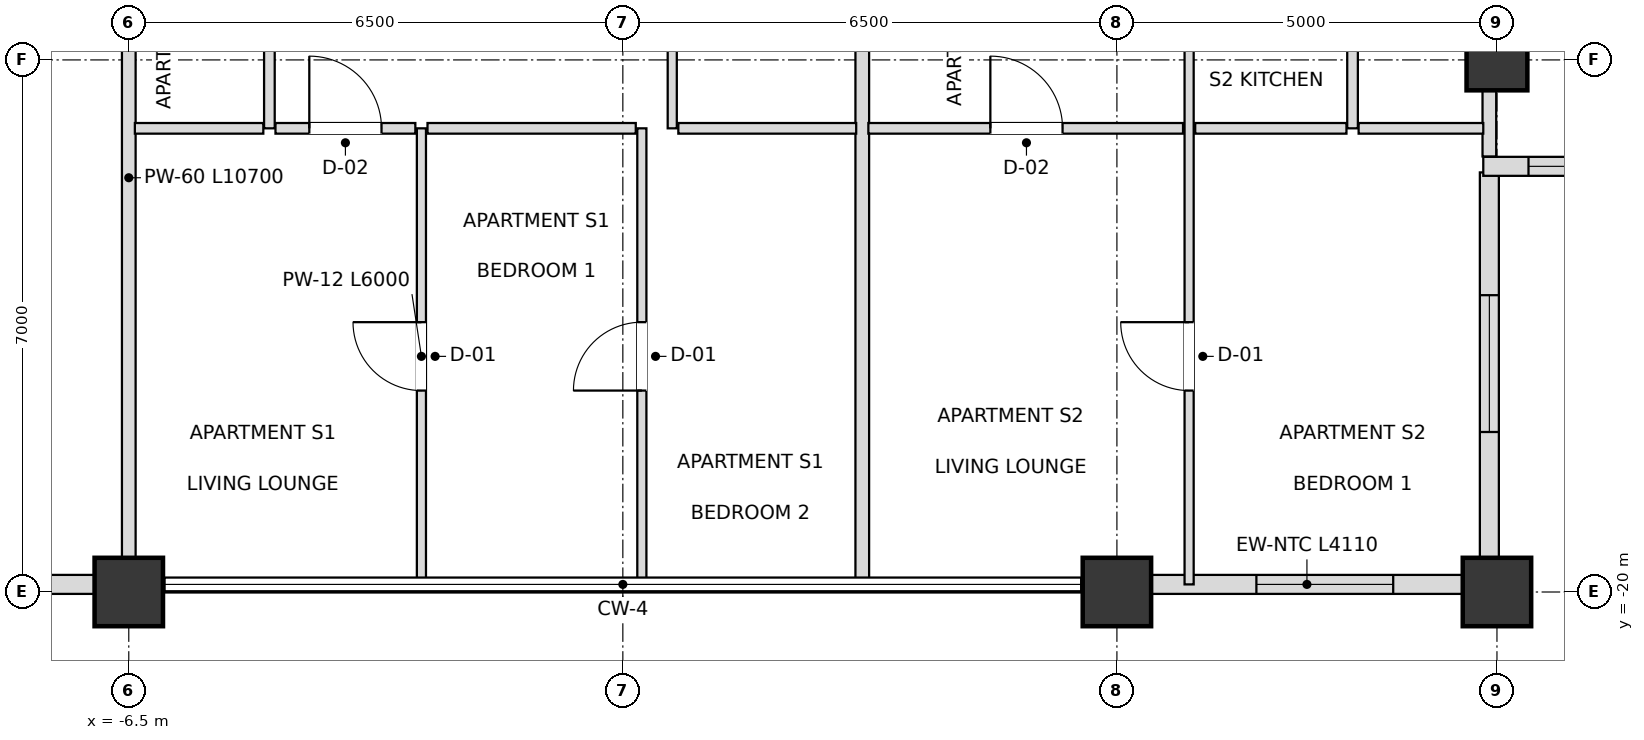
"""IFC4 building model, lengths in metres.
Left out: names, types, materials, properties, quantities, classifications, styles, units other than length and angle.
Written with IfcOpenShell. Run it as: python <this file> out.ifc"""

import sys

from ifc_helpers import new_model, si_unit, direction, frame, frame_2d, origin, origin_2d, place, context, subcontext, project, spatial, rectangle, extrude, element, fill, save


model = new_model("IFC4")
c1 = context("Model", 3, precision=1e-05, world=origin(), true_north=direction((0.0, 1.0)))
c2 = subcontext(c1, "Body", "Model", "MODEL_VIEW")
j1 = project(units=[si_unit("LENGTHUNIT", "METRE"), si_unit("PLANEANGLEUNIT", "RADIAN")], contexts=[c1])
p1 = place(None, origin())
s1 = spatial("IfcSite", under=j1, at=p1, CompositionType="ELEMENT")
p2 = place(p1, origin())
s2 = spatial("IfcBuilding", under=s1, at=p2, CompositionType="ELEMENT")
p3 = place(p2, frame((0.0, 0.0, 236.7)))
s3 = spatial("IfcBuildingStorey", under=s2, at=p3, CompositionType="ELEMENT", Elevation=236.7)
for number, where, z_axis, x_axis in (
    (1, (-6.5, -20.0, 0.0), (0.0, 0.0, 1.0), (1.0, 0.0, 0.0)),
    (2, (6.5, -20.0, 0.0), (0.0, 0.0, 1.0), (1.0, 0.0, 0.0)),
    (3, (11.5, -20.0, 0.0), (0.0, 0.0, 1.0), (1.0, 0.0, 0.0)),
):
    element("IfcColumn", number, at=place(p3, frame(where, z_axis=z_axis, x_axis=x_axis)), inside=s3, PredefinedType="USERDEFINED", context=c2, shape_type="SweptSolid", body=[
        extrude(rectangle(XDim=0.9, YDim=0.9, at=origin_2d()), origin(), (0.0, 0.0, 1.0), 3.6),
    ])
p4 = place(p3, frame((11.5, -13.0, 0.0), z_axis=(0.0, 0.0, 1.0), x_axis=(1.0, 0.0, 0.0)))
e4 = element("IfcColumn", 4, at=p4, inside=s3, PredefinedType="COLUMN", context=c2, shape_type="SweptSolid", body=[
    extrude(rectangle(XDim=0.8, YDim=0.8, at=origin_2d()), origin(), (0.0, 0.0, 1.0), 3.6),
])
p5 = place(p3, frame((-11.055, -19.9, 0.0), z_axis=(0.0, 0.0, 1.0), x_axis=(1.0, 0.0, 0.0)))
e5 = element("IfcWall", 5, at=p5, inside=s3, PredefinedType="SOLIDWALL", context=c2, shape_type="SweptSolid", body=[
    extrude(rectangle(XDim=4.11, YDim=0.25, at=frame_2d((2.055, 0.0))), origin(), (0.0, 0.0, 1.0), 2.748),
])
p6 = place(p5, frame((1.155, 0.0, 0.72)))
e6 = element("IfcOpeningElement", 6, at=p6, cuts=e5, PredefinedType="OPENING", context=c2, shape_type="SweptSolid", body=[
    extrude(rectangle(XDim=1.8, YDim=1.68, at=frame_2d((0.9, 0.84))), frame((0.0, 0.135, 0.0), z_axis=(0.0, -1.0, 0.0), x_axis=(1.0, 0.0, 0.0)), (0.0, 0.0, 1.0), 0.27),
])
p7 = place(p3, frame((6.945, -19.9, 0.0), z_axis=(0.0, 0.0, 1.0), x_axis=(1.0, 0.0, 0.0)))
e7 = element("IfcWall", 7, at=p7, inside=s3, PredefinedType="SOLIDWALL", context=c2, shape_type="SweptSolid", body=[
    extrude(rectangle(XDim=4.11, YDim=0.25, at=frame_2d((2.055, 0.0))), origin(), (0.0, 0.0, 1.0), 2.748),
])
p8 = place(p7, frame((1.39, 0.0, 0.72)))
e8 = element("IfcOpeningElement", 8, at=p8, cuts=e7, PredefinedType="OPENING", context=c2, shape_type="SweptSolid", body=[
    extrude(rectangle(XDim=1.8, YDim=1.68, at=frame_2d((0.9, 0.84))), frame((0.0, 0.135, 0.0), z_axis=(0.0, -1.0, 0.0), x_axis=(1.0, 0.0, 0.0)), (0.0, 0.0, 1.0), 0.27),
])
p9 = place(p3, frame((11.4, -19.82, 0.0), z_axis=(0.0, 0.0, 1.0), x_axis=(0.0, 1.0, 0.0)))
e9 = element("IfcWall", 9, at=p9, inside=s3, PredefinedType="SOLIDWALL", context=c2, shape_type="SweptSolid", body=[
    extrude(rectangle(XDim=5.34, YDim=0.25, at=frame_2d((2.67, 0.0))), origin(), (0.0, 0.0, 1.0), 2.748),
])
p10 = place(p9, frame((1.925, 0.0, 0.72)))
e10 = element("IfcOpeningElement", 10, at=p10, cuts=e9, PredefinedType="OPENING", context=c2, shape_type="SweptSolid", body=[
    extrude(rectangle(XDim=1.8, YDim=1.68, at=frame_2d((0.9, 0.84))), frame((0.0, 0.135, 0.0), z_axis=(0.0, -1.0, 0.0), x_axis=(1.0, 0.0, 0.0)), (0.0, 0.0, 1.0), 0.27),
])
p11 = place(p3, frame((11.32, -14.4, 0.0), z_axis=(0.0, 0.0, 1.0), x_axis=(1.0, 0.0, 0.0)))
e11 = element("IfcWall", 11, at=p11, inside=s3, PredefinedType="SOLIDWALL", context=c2, shape_type="SweptSolid", body=[
    extrude(rectangle(XDim=5.66, YDim=0.25, at=frame_2d((2.83, 0.0))), origin(), (0.0, 0.0, 1.0), 2.748),
])
p12 = place(p11, frame((0.595, 0.0, 0.72)))
e12 = element("IfcOpeningElement", 12, at=p12, cuts=e11, PredefinedType="OPENING", context=c2, shape_type="SweptSolid", body=[
    extrude(rectangle(XDim=1.8, YDim=1.68, at=frame_2d((0.9, 0.84))), frame((0.0, 0.135, 0.0), z_axis=(0.0, -1.0, 0.0), x_axis=(1.0, 0.0, 0.0)), (0.0, 0.0, 1.0), 0.27),
])
p13 = place(p11, frame((3.265, 0.0, 0.72)))
e13 = element("IfcOpeningElement", 13, at=p13, cuts=e11, PredefinedType="OPENING", context=c2, shape_type="SweptSolid", body=[
    extrude(rectangle(XDim=1.8, YDim=1.68, at=frame_2d((0.9, 0.84))), frame((0.0, 0.135, 0.0), z_axis=(0.0, -1.0, 0.0), x_axis=(1.0, 0.0, 0.0)), (0.0, 0.0, 1.0), 0.27),
])
p14 = place(p3, frame((-6.5, -19.9, 0.0), z_axis=(0.0, 0.0, 1.0), x_axis=(0.0, 1.0, 0.0)))
e14 = element("IfcWall", 14, at=p14, inside=s3, PredefinedType="PARTITIONING", context=c2, shape_type="SweptSolid", body=[
    extrude(rectangle(XDim=10.7, YDim=0.18, at=frame_2d((5.35, 0.0))), origin(), (0.0, 0.0, 1.0), 2.826),
])
p15 = place(p3, frame((-4.65, -13.9, 0.0), z_axis=(0.0, 0.0, 1.0), x_axis=(0.0, 1.0, 0.0)))
e15 = element("IfcWall", 15, at=p15, inside=s3, PredefinedType="PARTITIONING", context=c2, shape_type="SweptSolid", body=[
    extrude(rectangle(XDim=4.7, YDim=0.14, at=frame_2d((2.35, 0.0))), origin(), (0.0, 0.0, 1.0), 3.38),
])
p16 = place(p15, frame((1.9, 0.0, 0.0)))
e16 = element("IfcOpeningElement", 16, at=p16, cuts=e15, PredefinedType="OPENING", context=c2, shape_type="SweptSolid", body=[
    extrude(rectangle(XDim=0.9, YDim=2.1, at=frame_2d((0.45, 1.05))), frame((0.0, 0.08, 0.0), z_axis=(0.0, -1.0, 0.0), x_axis=(1.0, 0.0, 0.0)), (0.0, 0.0, 1.0), 0.16),
])
p17 = place(p3, frame((-2.65, -19.9, 0.0), z_axis=(0.0, 0.0, 1.0), x_axis=(0.0, 1.0, 0.0)))
e17 = element("IfcWall", 17, at=p17, inside=s3, PredefinedType="PARTITIONING", context=c2, shape_type="SweptSolid", body=[
    extrude(rectangle(XDim=6.0, YDim=0.12, at=frame_2d((3.0, 0.0))), origin(), (0.0, 0.0, 1.0), 3.018),
])
p18 = place(p17, frame((2.55, 0.0, 0.0)))
e18 = element("IfcOpeningElement", 18, at=p18, cuts=e17, PredefinedType="OPENING", context=c2, shape_type="SweptSolid", body=[
    extrude(rectangle(XDim=0.9, YDim=2.1, at=frame_2d((0.45, 1.05))), frame((0.0, 0.07, 0.0), z_axis=(0.0, -1.0, 0.0), x_axis=(1.0, 0.0, 0.0)), (0.0, 0.0, 1.0), 0.14),
])
p19 = place(p3, frame((0.25, -19.9, 0.0), z_axis=(0.0, 0.0, 1.0), x_axis=(0.0, 1.0, 0.0)))
e19 = element("IfcWall", 19, at=p19, inside=s3, PredefinedType="PARTITIONING", context=c2, shape_type="SweptSolid", body=[
    extrude(rectangle(XDim=6.0, YDim=0.12, at=frame_2d((3.0, 0.0))), origin(), (0.0, 0.0, 1.0), 3.018),
])
p20 = place(p19, frame((2.55, 0.0, 0.0)))
e20 = element("IfcOpeningElement", 20, at=p20, cuts=e19, PredefinedType="OPENING", context=c2, shape_type="SweptSolid", body=[
    extrude(rectangle(XDim=0.9, YDim=2.1, at=frame_2d((0.45, 1.05))), frame((0.0, 0.07, 0.0), z_axis=(0.0, -1.0, 0.0), x_axis=(1.0, 0.0, 0.0)), (0.0, 0.0, 1.0), 0.14),
])
p21 = place(p3, frame((0.65, -13.9, 0.0), z_axis=(0.0, 0.0, 1.0), x_axis=(0.0, 1.0, 0.0)))
e21 = element("IfcWall", 21, at=p21, inside=s3, PredefinedType="PARTITIONING", context=c2, shape_type="SweptSolid", body=[
    extrude(rectangle(XDim=4.7, YDim=0.12, at=frame_2d((2.35, 0.0))), origin(), (0.0, 0.0, 1.0), 3.38),
])
p22 = place(p21, frame((1.875, 0.0, 0.0)))
e22 = element("IfcOpeningElement", 22, at=p22, cuts=e21, PredefinedType="OPENING", context=c2, shape_type="SweptSolid", body=[
    extrude(rectangle(XDim=0.95, YDim=2.1, at=frame_2d((0.475, 1.05))), frame((0.0, 0.07, 0.0), z_axis=(0.0, -1.0, 0.0), x_axis=(1.0, 0.0, 0.0)), (0.0, 0.0, 1.0), 0.14),
])
p23 = place(p3, frame((3.15, -19.9, 0.0), z_axis=(0.0, 0.0, 1.0), x_axis=(0.0, 1.0, 0.0)))
e23 = element("IfcWall", 23, at=p23, inside=s3, PredefinedType="PARTITIONING", context=c2, shape_type="SweptSolid", body=[
    extrude(rectangle(XDim=10.7, YDim=0.18, at=frame_2d((5.35, 0.0))), origin(), (0.0, 0.0, 1.0), 3.018),
])
p24 = place(p3, frame((7.45, -19.9, 0.0), z_axis=(0.0, 0.0, 1.0), x_axis=(0.0, 1.0, 0.0)))
e24 = element("IfcWall", 24, at=p24, inside=s3, PredefinedType="PARTITIONING", context=c2, shape_type="SweptSolid", body=[
    extrude(rectangle(XDim=10.7, YDim=0.12, at=frame_2d((5.35, 0.0))), origin(), (0.0, 0.0, 1.0), 2.826),
])
p25 = place(p24, frame((7.875, 0.0, 0.0)))
e25 = element("IfcOpeningElement", 25, at=p25, cuts=e24, PredefinedType="OPENING", context=c2, shape_type="SweptSolid", body=[
    extrude(rectangle(XDim=0.95, YDim=2.1, at=frame_2d((0.475, 1.05))), frame((0.0, 0.07, 0.0), z_axis=(0.0, -1.0, 0.0), x_axis=(1.0, 0.0, 0.0)), (0.0, 0.0, 1.0), 0.14),
])
p26 = place(p24, frame((2.55, 0.0, 0.0)))
e26 = element("IfcOpeningElement", 26, at=p26, cuts=e24, PredefinedType="OPENING", context=c2, shape_type="SweptSolid", body=[
    extrude(rectangle(XDim=0.9, YDim=2.1, at=frame_2d((0.45, 1.05))), frame((0.0, 0.07, 0.0), z_axis=(0.0, -1.0, 0.0), x_axis=(1.0, 0.0, 0.0)), (0.0, 0.0, 1.0), 0.14),
])
p27 = place(p3, frame((9.6, -13.9, 0.0), z_axis=(0.0, 0.0, 1.0), x_axis=(0.0, 1.0, 0.0)))
e27 = element("IfcWall", 27, at=p27, inside=s3, PredefinedType="PARTITIONING", context=c2, shape_type="SweptSolid", body=[
    extrude(rectangle(XDim=4.7, YDim=0.14, at=frame_2d((2.35, 0.0))), origin(), (0.0, 0.0, 1.0), 2.826),
])
p28 = place(p27, frame((1.9, 0.0, 0.0)))
e28 = element("IfcOpeningElement", 28, at=p28, cuts=e27, PredefinedType="OPENING", context=c2, shape_type="SweptSolid", body=[
    extrude(rectangle(XDim=0.9, YDim=2.1, at=frame_2d((0.45, 1.05))), frame((0.0, 0.08, 0.0), z_axis=(0.0, -1.0, 0.0), x_axis=(1.0, 0.0, 0.0)), (0.0, 0.0, 1.0), 0.16),
])
p29 = place(p3, frame((11.4, -14.27, 0.0), z_axis=(0.0, 0.0, 1.0), x_axis=(0.0, 1.0, 0.0)))
e29 = element("IfcWall", 29, at=p29, inside=s3, PredefinedType="PARTITIONING", context=c2, shape_type="SweptSolid", body=[
    extrude(rectangle(XDim=5.07, YDim=0.18, at=frame_2d((2.535, 0.0))), origin(), (0.0, 0.0, 1.0), 2.748),
])
p30 = place(p3, frame((-6.42, -13.9, 0.0), z_axis=(0.0, 0.0, 1.0), x_axis=(1.0, 0.0, 0.0)))
e30 = element("IfcWall", 30, at=p30, inside=s3, PredefinedType="PARTITIONING", context=c2, shape_type="SweptSolid", body=[
    extrude(rectangle(XDim=1.69, YDim=0.14, at=frame_2d((0.845, 0.0))), origin(), (0.0, 0.0, 1.0), 3.38),
])
p31 = place(p3, frame((-4.57, -13.9, 0.0), z_axis=(0.0, 0.0, 1.0), x_axis=(1.0, 0.0, 0.0)))
e31 = element("IfcWall", 31, at=p31, inside=s3, PredefinedType="PARTITIONING", context=c2, shape_type="SweptSolid", body=[
    extrude(rectangle(XDim=1.84, YDim=0.14, at=frame_2d((0.92, 0.0))), origin(), (0.0, 0.0, 1.0), 3.38),
])
p32 = place(p31, frame((0.445, 0.0, 0.0)))
e32 = element("IfcOpeningElement", 32, at=p32, cuts=e31, PredefinedType="OPENING", context=c2, shape_type="SweptSolid", body=[
    extrude(rectangle(XDim=0.95, YDim=2.1, at=frame_2d((0.475, 1.05))), frame((0.0, 0.08, 0.0), z_axis=(0.0, -1.0, 0.0), x_axis=(1.0, 0.0, 0.0)), (0.0, 0.0, 1.0), 0.16),
])
p33 = place(p3, frame((-2.57, -13.9, 0.0), z_axis=(0.0, 0.0, 1.0), x_axis=(1.0, 0.0, 0.0)))
e33 = element("IfcWall", 33, at=p33, inside=s3, PredefinedType="PARTITIONING", context=c2, shape_type="SweptSolid", body=[
    extrude(rectangle(XDim=2.74, YDim=0.14, at=frame_2d((1.37, 0.0))), origin(), (0.0, 0.0, 1.0), 3.38),
])
p34 = place(p3, frame((0.73, -13.9, 0.0), z_axis=(0.0, 0.0, 1.0), x_axis=(1.0, 0.0, 0.0)))
e34 = element("IfcWall", 34, at=p34, inside=s3, PredefinedType="PARTITIONING", context=c2, shape_type="SweptSolid", body=[
    extrude(rectangle(XDim=2.34, YDim=0.14, at=frame_2d((1.17, 0.0))), origin(), (0.0, 0.0, 1.0), 3.38),
])
p35 = place(p3, frame((3.23, -13.9, 0.0), z_axis=(0.0, 0.0, 1.0), x_axis=(1.0, 0.0, 0.0)))
e35 = element("IfcWall", 35, at=p35, inside=s3, PredefinedType="PARTITIONING", context=c2, shape_type="SweptSolid", body=[
    extrude(rectangle(XDim=4.14, YDim=0.14, at=frame_2d((2.07, 0.0))), origin(), (0.0, 0.0, 1.0), 2.826),
])
p36 = place(p35, frame((1.605, 0.0, 0.0)))
e36 = element("IfcOpeningElement", 36, at=p36, cuts=e35, PredefinedType="OPENING", context=c2, shape_type="SweptSolid", body=[
    extrude(rectangle(XDim=0.95, YDim=2.1, at=frame_2d((0.475, 1.05))), frame((0.0, 0.08, 0.0), z_axis=(0.0, -1.0, 0.0), x_axis=(1.0, 0.0, 0.0)), (0.0, 0.0, 1.0), 0.16),
])
p37 = place(p3, frame((7.53, -13.9, 0.0), z_axis=(0.0, 0.0, 1.0), x_axis=(1.0, 0.0, 0.0)))
e37 = element("IfcWall", 37, at=p37, inside=s3, PredefinedType="PARTITIONING", context=c2, shape_type="SweptSolid", body=[
    extrude(rectangle(XDim=1.99, YDim=0.14, at=frame_2d((0.995, 0.0))), origin(), (0.0, 0.0, 1.0), 3.38),
])
p38 = place(p3, frame((9.68, -13.9, 0.0), z_axis=(0.0, 0.0, 1.0), x_axis=(1.0, 0.0, 0.0)))
e38 = element("IfcWall", 38, at=p38, inside=s3, PredefinedType="PARTITIONING", context=c2, shape_type="SweptSolid", body=[
    extrude(rectangle(XDim=1.64, YDim=0.14, at=frame_2d((0.82, 0.0))), origin(), (0.0, 0.0, 1.0), 3.38),
])
p39 = place(p8, origin())
e39 = element("IfcWindow", 39, at=p39, inside=s3, PartitioningType="SINGLE_PANEL", PredefinedType="WINDOW", context=c2, shape_type="SweptSolid", body=[
    extrude(rectangle(XDim=1.8, YDim=1.68, at=frame_2d((0.9, 0.84))), frame((0.0, 0.03, 0.0), z_axis=(0.0, -1.0, 0.0), x_axis=(1.0, 0.0, 0.0)), (0.0, 0.0, 1.0), 0.06),
])
fill(e8, e39)
p40 = place(p10, origin())
e40 = element("IfcWindow", 40, at=p40, inside=s3, PartitioningType="SINGLE_PANEL", PredefinedType="WINDOW", context=c2, shape_type="SweptSolid", body=[
    extrude(rectangle(XDim=1.8, YDim=1.68, at=frame_2d((0.9, 0.84))), frame((0.0, 0.03, 0.0), z_axis=(0.0, -1.0, 0.0), x_axis=(1.0, 0.0, 0.0)), (0.0, 0.0, 1.0), 0.06),
])
fill(e10, e40)
p41 = place(p12, origin())
e41 = element("IfcWindow", 41, at=p41, inside=s3, PartitioningType="SINGLE_PANEL", PredefinedType="WINDOW", context=c2, shape_type="SweptSolid", body=[
    extrude(rectangle(XDim=1.8, YDim=1.68, at=frame_2d((0.9, 0.84))), frame((0.0, 0.03, 0.0), z_axis=(0.0, -1.0, 0.0), x_axis=(1.0, 0.0, 0.0)), (0.0, 0.0, 1.0), 0.06),
])
fill(e12, e41)
p42 = place(p32, origin())
e42 = element("IfcDoor", 42, at=p42, inside=s3, OperationType="SINGLE_SWING_LEFT", PredefinedType="DOOR", context=c2, shape_type="SweptSolid", body=[
    extrude(rectangle(XDim=0.95, YDim=2.1, at=frame_2d((0.475, 1.05))), frame((0.0, 0.025, 0.0), z_axis=(0.0, -1.0, 0.0), x_axis=(1.0, 0.0, 0.0)), (0.0, 0.0, 1.0), 0.05),
])
fill(e32, e42)
p43 = place(p18, origin())
e43 = element("IfcDoor", 43, at=p43, inside=s3, OperationType="SINGLE_SWING_RIGHT", PredefinedType="DOOR", context=c2, shape_type="SweptSolid", body=[
    extrude(rectangle(XDim=0.9, YDim=2.1, at=frame_2d((0.45, 1.05))), frame((0.0, 0.025, 0.0), z_axis=(0.0, -1.0, 0.0), x_axis=(1.0, 0.0, 0.0)), (0.0, 0.0, 1.0), 0.05),
])
fill(e18, e43)
p44 = place(p20, origin())
e44 = element("IfcDoor", 44, at=p44, inside=s3, OperationType="SINGLE_SWING_LEFT", PredefinedType="DOOR", context=c2, shape_type="SweptSolid", body=[
    extrude(rectangle(XDim=0.9, YDim=2.1, at=frame_2d((0.45, 1.05))), frame((0.0, 0.025, 0.0), z_axis=(0.0, -1.0, 0.0), x_axis=(1.0, 0.0, 0.0)), (0.0, 0.0, 1.0), 0.05),
])
fill(e20, e44)
p45 = place(p36, origin())
e45 = element("IfcDoor", 45, at=p45, inside=s3, OperationType="SINGLE_SWING_LEFT", PredefinedType="DOOR", context=c2, shape_type="SweptSolid", body=[
    extrude(rectangle(XDim=0.95, YDim=2.1, at=frame_2d((0.475, 1.05))), frame((0.0, 0.025, 0.0), z_axis=(0.0, -1.0, 0.0), x_axis=(1.0, 0.0, 0.0)), (0.0, 0.0, 1.0), 0.05),
])
fill(e36, e45)
p46 = place(p26, origin())
e46 = element("IfcDoor", 46, at=p46, inside=s3, OperationType="SINGLE_SWING_RIGHT", PredefinedType="DOOR", context=c2, shape_type="SweptSolid", body=[
    extrude(rectangle(XDim=0.9, YDim=2.1, at=frame_2d((0.45, 1.05))), frame((0.0, 0.025, 0.0), z_axis=(0.0, -1.0, 0.0), x_axis=(1.0, 0.0, 0.0)), (0.0, 0.0, 1.0), 0.05),
])
fill(e26, e46)
save(model, sys.argv[1])
